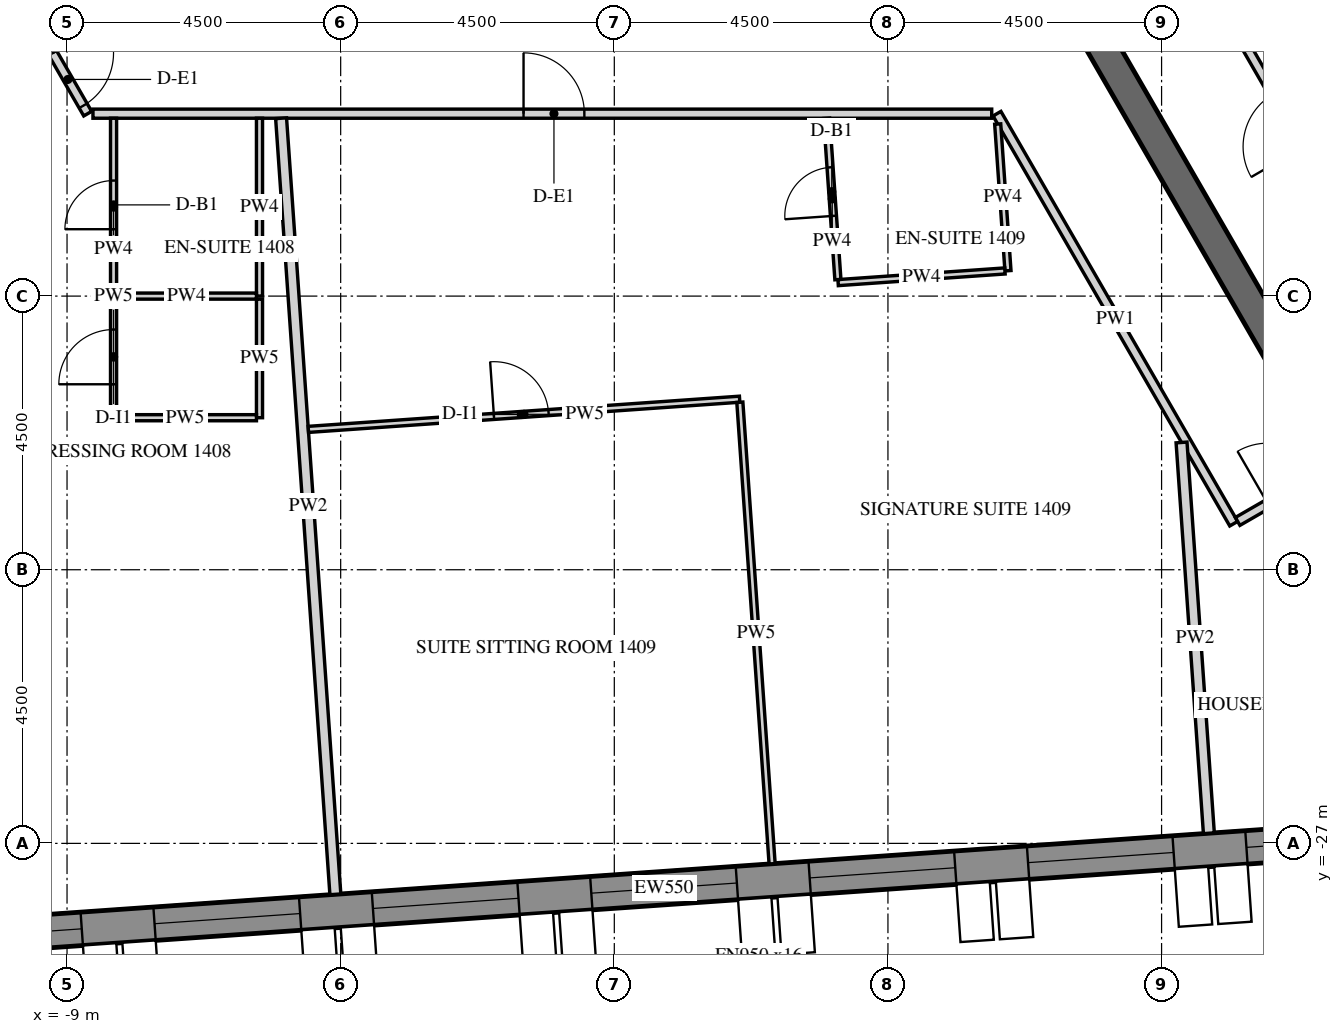
"""IFC4 building model, lengths in metres.
Left out: names, types, materials, properties, quantities, classifications, styles, units other than length and angle.
Written with IfcOpenShell. Run it as: python <this file> out.ifc"""

import sys

from ifc_helpers import new_model, si_unit, direction, frame, frame_2d, origin, place, context, subcontext, project, spatial, polyline, rectangle, outline, extrude, element, fill, save


model = new_model("IFC4")
c1 = context("Model", 3, precision=1e-05, world=origin(), true_north=direction((0.0, 1.0)))
c2 = subcontext(c1, "Body", "Model", "MODEL_VIEW")
j1 = project(units=[si_unit("LENGTHUNIT", "METRE"), si_unit("PLANEANGLEUNIT", "RADIAN")], contexts=[c1])
p1 = place(None, origin())
s1 = spatial("IfcSite", under=j1, at=p1, CompositionType="ELEMENT")
p2 = place(p1, origin())
s2 = spatial("IfcBuilding", under=s1, at=p2, CompositionType="ELEMENT")
p3 = place(p2, frame((0.0, 0.0, 183.9)))
s3 = spatial("IfcBuildingStorey", under=s2, at=p3, CompositionType="ELEMENT", Elevation=183.9)
p4 = place(p3, frame((-13.026, -28.704, -0.15), z_axis=(0.0, 0.0, 1.0), x_axis=(0.99756406806, 0.069756219185, 0.0)))
e1 = element("IfcWall", 1, at=p4, inside=s3, PredefinedType="SOLIDWALL", context=c2, shape_type="SweptSolid", body=[
    extrude(outline(polyline([(-0.026, -0.275), (27.78, -0.275), (27.735, 0.275), (0.026, 0.275), (-0.026, -0.275)])), origin(), (0.0, 0.0, 1.0), 3.9),
])
p5 = place(p4, frame((1.879, 0.0, 1.05)))
e2 = element("IfcOpeningElement", 2, at=p5, cuts=e1, PredefinedType="OPENING", context=c2, shape_type="SweptSolid", body=[
    extrude(rectangle(XDim=2.4, YDim=2.4, at=frame_2d((1.2, 1.2))), frame((0.0, 0.285, 0.0), z_axis=(0.0, -1.0, 0.0), x_axis=(1.0, 0.0, 0.0)), (0.0, 0.0, 1.0), 0.57),
])
p6 = place(p4, frame((5.479, 0.0, 1.05)))
e3 = element("IfcOpeningElement", 3, at=p6, cuts=e1, PredefinedType="OPENING", context=c2, shape_type="SweptSolid", body=[
    extrude(rectangle(XDim=2.4, YDim=2.4, at=frame_2d((1.2, 1.2))), frame((0.0, 0.285, 0.0), z_axis=(0.0, -1.0, 0.0), x_axis=(1.0, 0.0, 0.0)), (0.0, 0.0, 1.0), 0.57),
])
p7 = place(p4, frame((9.079, 0.0, 1.05)))
e4 = element("IfcOpeningElement", 4, at=p7, cuts=e1, PredefinedType="OPENING", context=c2, shape_type="SweptSolid", body=[
    extrude(rectangle(XDim=2.4, YDim=2.4, at=frame_2d((1.2, 1.2))), frame((0.0, 0.285, 0.0), z_axis=(0.0, -1.0, 0.0), x_axis=(1.0, 0.0, 0.0)), (0.0, 0.0, 1.0), 0.57),
])
p8 = place(p4, frame((12.679, 0.0, 1.05)))
e5 = element("IfcOpeningElement", 5, at=p8, cuts=e1, PredefinedType="OPENING", context=c2, shape_type="SweptSolid", body=[
    extrude(rectangle(XDim=2.4, YDim=2.4, at=frame_2d((1.2, 1.2))), frame((0.0, 0.285, 0.0), z_axis=(0.0, -1.0, 0.0), x_axis=(1.0, 0.0, 0.0)), (0.0, 0.0, 1.0), 0.57),
])
p9 = place(p4, frame((16.279, 0.0, 1.05)))
e6 = element("IfcOpeningElement", 6, at=p9, cuts=e1, PredefinedType="OPENING", context=c2, shape_type="SweptSolid", body=[
    extrude(rectangle(XDim=2.4, YDim=2.4, at=frame_2d((1.2, 1.2))), frame((0.0, 0.285, 0.0), z_axis=(0.0, -1.0, 0.0), x_axis=(1.0, 0.0, 0.0)), (0.0, 0.0, 1.0), 0.57),
])
p10 = place(p4, frame((19.879, 0.0, 1.05)))
e7 = element("IfcOpeningElement", 7, at=p10, cuts=e1, PredefinedType="OPENING", context=c2, shape_type="SweptSolid", body=[
    extrude(rectangle(XDim=2.4, YDim=2.4, at=frame_2d((1.2, 1.2))), frame((0.0, 0.285, 0.0), z_axis=(0.0, -1.0, 0.0), x_axis=(1.0, 0.0, 0.0)), (0.0, 0.0, 1.0), 0.57),
])
p11 = place(p4, frame((23.479, 0.0, 1.05)))
e8 = element("IfcOpeningElement", 8, at=p11, cuts=e1, PredefinedType="OPENING", context=c2, shape_type="SweptSolid", body=[
    extrude(rectangle(XDim=2.4, YDim=2.4, at=frame_2d((1.2, 1.2))), frame((0.0, 0.285, 0.0), z_axis=(0.0, -1.0, 0.0), x_axis=(1.0, 0.0, 0.0)), (0.0, 0.0, 1.0), 0.57),
])
p12 = place(p3, frame((7.506, -13.0, -0.15), z_axis=(0.0, 0.0, 1.0), x_axis=(0.499988271576, -0.866032175087, 0.0)))
e9 = element("IfcWall", 9, at=p12, inside=s3, PredefinedType="SHEAR", context=c2, shape_type="SweptSolid", body=[
    extrude(rectangle(XDim=15.424, YDim=0.5, at=frame_2d((7.712, 0.0))), origin(), (0.0, 0.0, 1.0), 3.9),
])
p13 = place(p12, frame((6.812, 0.0, 0.15)))
e10 = element("IfcOpeningElement", 10, at=p13, cuts=e9, PredefinedType="OPENING", context=c2, shape_type="SweptSolid", body=[
    extrude(rectangle(XDim=1.8, YDim=2.4, at=frame_2d((0.9, 1.2))), frame((0.0, 0.26, 0.0), z_axis=(0.0, -1.0, 0.0), x_axis=(1.0, 0.0, 0.0)), (0.0, 0.0, 1.0), 0.52),
])
p14 = place(p3, frame((-16.094, -2.125, 0.0), z_axis=(0.0, 0.0, 1.0), x_axis=(0.500010545262, -0.866019315389, 0.0)))
e11 = element("IfcWall", 11, at=p14, inside=s3, PredefinedType="PARTITIONING", context=c2, shape_type="SweptSolid", body=[
    extrude(rectangle(XDim=14.867, YDim=0.15, at=frame_2d((7.434, 0.0))), origin(), (0.0, 0.0, 1.0), 2.988),
])
p15 = place(p14, frame((1.019, 0.0, 0.0)))
e12 = element("IfcOpeningElement", 12, at=p15, cuts=e11, PredefinedType="OPENING", context=c2, shape_type="SweptSolid", body=[
    extrude(rectangle(XDim=1.0, YDim=2.1, at=frame_2d((0.5, 1.05))), frame((0.0, 0.085, 0.0), z_axis=(0.0, -1.0, 0.0), x_axis=(1.0, 0.0, 0.0)), (0.0, 0.0, 1.0), 0.17),
])
p16 = place(p14, frame((9.824, 0.0, 0.0)))
e13 = element("IfcOpeningElement", 13, at=p16, cuts=e11, PredefinedType="OPENING", context=c2, shape_type="SweptSolid", body=[
    extrude(rectangle(XDim=1.0, YDim=2.1, at=frame_2d((0.5, 1.05))), frame((0.0, 0.085, 0.0), z_axis=(0.0, -1.0, 0.0), x_axis=(1.0, 0.0, 0.0)), (0.0, 0.0, 1.0), 0.17),
])
p17 = place(p14, frame((13.717, 0.0, 0.0)))
e14 = element("IfcOpeningElement", 14, at=p17, cuts=e11, PredefinedType="OPENING", context=c2, shape_type="SweptSolid", body=[
    extrude(rectangle(XDim=1.0, YDim=2.1, at=frame_2d((0.5, 1.05))), frame((0.0, 0.085, 0.0), z_axis=(0.0, -1.0, 0.0), x_axis=(1.0, 0.0, 0.0)), (0.0, 0.0, 1.0), 0.17),
])
p18 = place(p3, frame((-8.574, -15.0, 0.0), z_axis=(0.0, 0.0, 1.0), x_axis=(1.0, 0.0, 0.0)))
e15 = element("IfcWall", 15, at=p18, inside=s3, PredefinedType="PARTITIONING", context=c2, shape_type="SweptSolid", body=[
    extrude(rectangle(XDim=14.78, YDim=0.15, at=frame_2d((7.39, 0.0))), origin(), (0.0, 0.0, 1.0), 2.988),
])
p19 = place(p18, frame((7.081, 0.0, 0.0)))
e16 = element("IfcOpeningElement", 16, at=p19, cuts=e15, PredefinedType="OPENING", context=c2, shape_type="SweptSolid", body=[
    extrude(rectangle(XDim=1.0, YDim=2.1, at=frame_2d((0.5, 1.05))), frame((0.0, 0.085, 0.0), z_axis=(0.0, -1.0, 0.0), x_axis=(1.0, 0.0, 0.0)), (0.0, 0.0, 1.0), 0.17),
])
p20 = place(p3, frame((6.293, -15.0, 0.0), z_axis=(0.0, 0.0, 1.0), x_axis=(0.499980313799, -0.86603676932, 0.0)))
e17 = element("IfcWall", 17, at=p20, inside=s3, PredefinedType="PARTITIONING", context=c2, shape_type="SweptSolid", body=[
    extrude(rectangle(XDim=7.786, YDim=0.15, at=frame_2d((3.893, 0.0))), origin(), (0.0, 0.0, 1.0), 2.988),
])
p21 = place(p3, frame((10.251, -21.705, 0.0), z_axis=(0.0, 0.0, 1.0), x_axis=(0.866013532718, 0.500020560727, 0.0)))
e18 = element("IfcWall", 18, at=p21, inside=s3, PredefinedType="PARTITIONING", context=c2, shape_type="SweptSolid", body=[
    extrude(rectangle(XDim=1.725, YDim=0.15, at=frame_2d((0.863, 0.0))), origin(), (0.0, 0.0, 1.0), 2.988),
])
p22 = place(p21, frame((0.575, 0.0, 0.0)))
e19 = element("IfcOpeningElement", 19, at=p22, cuts=e18, PredefinedType="OPENING", context=c2, shape_type="SweptSolid", body=[
    extrude(rectangle(XDim=1.0, YDim=2.1, at=frame_2d((0.5, 1.05))), frame((0.0, 0.085, 0.0), z_axis=(0.0, -1.0, 0.0), x_axis=(1.0, 0.0, 0.0)), (0.0, 0.0, 1.0), 0.17),
])
p23 = place(p3, frame((13.699, -19.628, 0.0), z_axis=(0.0, 0.0, 1.0), x_axis=(-0.499993780622, 0.866028994514, 0.0)))
e20 = element("IfcWall", 20, at=p23, inside=s3, PredefinedType="PARTITIONING", context=c2, shape_type="SweptSolid", body=[
    extrude(rectangle(XDim=7.711, YDim=0.15, at=frame_2d((3.855, 0.0))), origin(), (0.0, 0.0, 1.0), 2.988),
])
p24 = place(p23, frame((4.718, 0.0, 0.0)))
e21 = element("IfcOpeningElement", 21, at=p24, cuts=e20, PredefinedType="OPENING", context=c2, shape_type="SweptSolid", body=[
    extrude(rectangle(XDim=1.0, YDim=2.1, at=frame_2d((0.5, 1.05))), frame((0.0, 0.085, 0.0), z_axis=(0.0, -1.0, 0.0), x_axis=(1.0, 0.0, 0.0)), (0.0, 0.0, 1.0), 0.17),
])
p25 = place(p3, frame((-8.235, -18.0, 0.0), z_axis=(0.0, 0.0, 1.0), x_axis=(0.0, 1.0, 0.0)))
e22 = element("IfcWall", 22, at=p25, inside=s3, PredefinedType="PARTITIONING", context=c2, shape_type="SweptSolid", body=[
    extrude(rectangle(XDim=2.925, YDim=0.1, at=frame_2d((1.462, 0.0))), origin(), (0.0, 0.0, 1.0), 2.988),
])
p26 = place(p25, frame((1.1, 0.0, 0.0)))
e23 = element("IfcOpeningElement", 23, at=p26, cuts=e22, PredefinedType="OPENING", context=c2, shape_type="SweptSolid", body=[
    extrude(rectangle(XDim=0.8, YDim=2.1, at=frame_2d((0.4, 1.05))), frame((0.0, 0.06, 0.0), z_axis=(0.0, -1.0, 0.0), x_axis=(1.0, 0.0, 0.0)), (0.0, 0.0, 1.0), 0.12),
])
p27 = place(p3, frame((-5.835, -15.075, 0.0), z_axis=(0.0, 0.0, 1.0), x_axis=(0.0, -1.0, 0.0)))
e24 = element("IfcWall", 24, at=p27, inside=s3, PredefinedType="PARTITIONING", context=c2, shape_type="SweptSolid", body=[
    extrude(rectangle(XDim=2.925, YDim=0.1, at=frame_2d((1.462, 0.0))), origin(), (0.0, 0.0, 1.0), 2.988),
])
p28 = place(p3, frame((-5.835, -18.05, 0.0), z_axis=(0.0, 0.0, 1.0), x_axis=(0.0, -1.0, 0.0)))
e25 = element("IfcWall", 25, at=p28, inside=s3, PredefinedType="PARTITIONING", context=c2, shape_type="SweptSolid", body=[
    extrude(rectangle(XDim=1.95, YDim=0.1, at=frame_2d((0.975, 0.0))), origin(), (0.0, 0.0, 1.0), 2.988),
])
p29 = place(p3, frame((-5.885, -20.0, 0.0), z_axis=(0.0, 0.0, 1.0), x_axis=(-1.0, 0.0, 0.0)))
e26 = element("IfcWall", 26, at=p29, inside=s3, PredefinedType="PARTITIONING", context=c2, shape_type="SweptSolid", body=[
    extrude(rectangle(XDim=2.35, YDim=0.1, at=frame_2d((1.175, 0.0))), origin(), (0.0, 0.0, 1.0), 2.988),
])
p30 = place(p3, frame((-8.235, -19.95, 0.0), z_axis=(0.0, 0.0, 1.0), x_axis=(0.0, 1.0, 0.0)))
e27 = element("IfcWall", 27, at=p30, inside=s3, PredefinedType="PARTITIONING", context=c2, shape_type="SweptSolid", body=[
    extrude(rectangle(XDim=1.9, YDim=0.1, at=frame_2d((0.95, 0.0))), origin(), (0.0, 0.0, 1.0), 2.988),
])
p31 = place(p30, frame((0.5, 0.0, 0.0)))
e28 = element("IfcOpeningElement", 28, at=p31, cuts=e27, PredefinedType="OPENING", context=c2, shape_type="SweptSolid", body=[
    extrude(rectangle(XDim=0.9, YDim=2.1, at=frame_2d((0.45, 1.05))), frame((0.0, 0.06, 0.0), z_axis=(0.0, -1.0, 0.0), x_axis=(1.0, 0.0, 0.0)), (0.0, 0.0, 1.0), 0.12),
])
p32 = place(p3, frame((-4.587, -27.838, 0.0), z_axis=(0.0, 0.0, 1.0), x_axis=(-0.069764754112, 0.997563471206, 0.0)))
e29 = element("IfcWall", 29, at=p32, inside=s3, PredefinedType="PARTITIONING", context=c2, shape_type="SweptSolid", body=[
    extrude(rectangle(XDim=12.794, YDim=0.18, at=frame_2d((6.397, 0.0))), origin(), (0.0, 0.0, 1.0), 2.988),
])
p33 = place(p3, frame((-8.185, -18.0, 0.0), z_axis=(0.0, 0.0, 1.0), x_axis=(1.0, 0.0, 0.0)))
e30 = element("IfcWall", 30, at=p33, inside=s3, PredefinedType="PARTITIONING", context=c2, shape_type="SweptSolid", body=[
    extrude(rectangle(XDim=2.3, YDim=0.1, at=frame_2d((1.15, 0.0))), origin(), (0.0, 0.0, 1.0), 2.988),
])
p34 = place(p3, frame((6.305, -15.171, 0.0), z_axis=(0.0, 0.0, 1.0), x_axis=(0.069661348173, -0.99757069753, 0.0)))
e31 = element("IfcWall", 31, at=p34, inside=s3, PredefinedType="PARTITIONING", context=c2, shape_type="SweptSolid", body=[
    extrude(rectangle(XDim=2.418, YDim=0.1, at=frame_2d((1.209, 0.0))), origin(), (0.0, 0.0, 1.0), 2.988),
])
p35 = place(p3, frame((6.424, -17.586, 0.0), z_axis=(0.0, 0.0, 1.0), x_axis=(-0.997562182015, -0.069783185748, 0.0)))
e32 = element("IfcWall", 32, at=p35, inside=s3, PredefinedType="PARTITIONING", context=c2, shape_type="SweptSolid", body=[
    extrude(rectangle(XDim=2.75, YDim=0.1, at=frame_2d((1.375, 0.0))), origin(), (0.0, 0.0, 1.0), 2.988),
])
p36 = place(p3, frame((3.677, -17.728, 0.0), z_axis=(0.0, 0.0, 1.0), x_axis=(-0.069759707979, 0.997563824095, 0.0)))
e33 = element("IfcWall", 33, at=p36, inside=s3, PredefinedType="PARTITIONING", context=c2, shape_type="SweptSolid", body=[
    extrude(rectangle(XDim=2.66, YDim=0.1, at=frame_2d((1.33, 0.0))), origin(), (0.0, 0.0, 1.0), 2.988),
])
p37 = place(p36, frame((1.05, 0.0, 0.0)))
e34 = element("IfcOpeningElement", 34, at=p37, cuts=e33, PredefinedType="OPENING", context=c2, shape_type="SweptSolid", body=[
    extrude(rectangle(XDim=0.8, YDim=2.1, at=frame_2d((0.4, 1.05))), frame((0.0, 0.06, 0.0), z_axis=(0.0, -1.0, 0.0), x_axis=(1.0, 0.0, 0.0)), (0.0, 0.0, 1.0), 0.12),
])
p38 = place(p3, frame((-5.032, -20.192, 0.0), z_axis=(0.0, 0.0, 1.0), x_axis=(0.997562888251, 0.069773089251, 0.0)))
e35 = element("IfcWall", 35, at=p38, inside=s3, PredefinedType="PARTITIONING", context=c2, shape_type="SweptSolid", body=[
    extrude(rectangle(XDim=7.11, YDim=0.1, at=frame_2d((3.555, 0.0))), origin(), (0.0, 0.0, 1.0), 2.988),
])
p39 = place(p38, frame((3.06, 0.0, 0.0)))
e36 = element("IfcOpeningElement", 36, at=p39, cuts=e35, PredefinedType="OPENING", context=c2, shape_type="SweptSolid", body=[
    extrude(rectangle(XDim=0.9, YDim=2.1, at=frame_2d((0.45, 1.05))), frame((0.0, 0.06, 0.0), z_axis=(0.0, -1.0, 0.0), x_axis=(1.0, 0.0, 0.0)), (0.0, 0.0, 1.0), 0.12),
])
p40 = place(p3, frame((2.064, -19.746, 0.0), z_axis=(0.0, 0.0, 1.0), x_axis=(0.069762387692, -0.997563636699, 0.0)))
e37 = element("IfcWall", 37, at=p40, inside=s3, PredefinedType="PARTITIONING", context=c2, shape_type="SweptSolid", body=[
    extrude(rectangle(XDim=7.608, YDim=0.1, at=frame_2d((3.804, 0.0))), origin(), (0.0, 0.0, 1.0), 2.988),
])
p41 = place(p3, frame((9.778, -26.833, 0.0), z_axis=(0.0, 0.0, 1.0), x_axis=(-0.069733334443, 0.997565668048, 0.0)))
e38 = element("IfcWall", 38, at=p41, inside=s3, PredefinedType="PARTITIONING", context=c2, shape_type="SweptSolid", body=[
    extrude(rectangle(XDim=6.442, YDim=0.18, at=frame_2d((3.221, 0.0))), origin(), (0.0, 0.0, 1.0), 2.988),
])
p42 = place(p5, frame((0.0, 0.205, 0.0)))
e39 = element("IfcWindow", 39, at=p42, inside=s3, PartitioningType="DOUBLE_PANEL_VERTICAL", PredefinedType="WINDOW", context=c2, shape_type="SweptSolid", body=[
    extrude(rectangle(XDim=2.4, YDim=2.4, at=frame_2d((1.2, 1.2))), frame((0.0, 0.03, 0.0), z_axis=(0.0, -1.0, 0.0), x_axis=(1.0, 0.0, 0.0)), (0.0, 0.0, 1.0), 0.06),
])
fill(e2, e39)
p43 = place(p6, frame((0.0, 0.205, 0.0)))
e40 = element("IfcWindow", 40, at=p43, inside=s3, PartitioningType="DOUBLE_PANEL_VERTICAL", PredefinedType="WINDOW", context=c2, shape_type="SweptSolid", body=[
    extrude(rectangle(XDim=2.4, YDim=2.4, at=frame_2d((1.2, 1.2))), frame((0.0, 0.03, 0.0), z_axis=(0.0, -1.0, 0.0), x_axis=(1.0, 0.0, 0.0)), (0.0, 0.0, 1.0), 0.06),
])
fill(e3, e40)
p44 = place(p7, frame((0.0, 0.205, 0.0)))
e41 = element("IfcWindow", 41, at=p44, inside=s3, PartitioningType="DOUBLE_PANEL_VERTICAL", PredefinedType="WINDOW", context=c2, shape_type="SweptSolid", body=[
    extrude(rectangle(XDim=2.4, YDim=2.4, at=frame_2d((1.2, 1.2))), frame((0.0, 0.03, 0.0), z_axis=(0.0, -1.0, 0.0), x_axis=(1.0, 0.0, 0.0)), (0.0, 0.0, 1.0), 0.06),
])
fill(e4, e41)
p45 = place(p8, frame((0.0, 0.205, 0.0)))
e42 = element("IfcWindow", 42, at=p45, inside=s3, PartitioningType="DOUBLE_PANEL_VERTICAL", PredefinedType="WINDOW", context=c2, shape_type="SweptSolid", body=[
    extrude(rectangle(XDim=2.4, YDim=2.4, at=frame_2d((1.2, 1.2))), frame((0.0, 0.03, 0.0), z_axis=(0.0, -1.0, 0.0), x_axis=(1.0, 0.0, 0.0)), (0.0, 0.0, 1.0), 0.06),
])
fill(e5, e42)
p46 = place(p9, frame((0.0, 0.205, 0.0)))
e43 = element("IfcWindow", 43, at=p46, inside=s3, PartitioningType="DOUBLE_PANEL_VERTICAL", PredefinedType="WINDOW", context=c2, shape_type="SweptSolid", body=[
    extrude(rectangle(XDim=2.4, YDim=2.4, at=frame_2d((1.2, 1.2))), frame((0.0, 0.03, 0.0), z_axis=(0.0, -1.0, 0.0), x_axis=(1.0, 0.0, 0.0)), (0.0, 0.0, 1.0), 0.06),
])
fill(e6, e43)
p47 = place(p10, frame((0.0, 0.205, 0.0)))
e44 = element("IfcWindow", 44, at=p47, inside=s3, PartitioningType="DOUBLE_PANEL_VERTICAL", PredefinedType="WINDOW", context=c2, shape_type="SweptSolid", body=[
    extrude(rectangle(XDim=2.4, YDim=2.4, at=frame_2d((1.2, 1.2))), frame((0.0, 0.03, 0.0), z_axis=(0.0, -1.0, 0.0), x_axis=(1.0, 0.0, 0.0)), (0.0, 0.0, 1.0), 0.06),
])
fill(e7, e44)
p48 = place(p11, frame((0.0, 0.205, 0.0)))
e45 = element("IfcWindow", 45, at=p48, inside=s3, PartitioningType="DOUBLE_PANEL_VERTICAL", PredefinedType="WINDOW", context=c2, shape_type="SweptSolid", body=[
    extrude(rectangle(XDim=2.4, YDim=2.4, at=frame_2d((1.2, 1.2))), frame((0.0, 0.03, 0.0), z_axis=(0.0, -1.0, 0.0), x_axis=(1.0, 0.0, 0.0)), (0.0, 0.0, 1.0), 0.06),
])
fill(e8, e45)
p49 = place(p17, origin())
e46 = element("IfcDoor", 46, at=p49, inside=s3, OperationType="SINGLE_SWING_LEFT", PredefinedType="DOOR", context=c2, shape_type="SweptSolid", body=[
    extrude(rectangle(XDim=1.0, YDim=2.1, at=frame_2d((0.5, 1.05))), frame((0.0, 0.025, 0.0), z_axis=(0.0, -1.0, 0.0), x_axis=(1.0, 0.0, 0.0)), (0.0, 0.0, 1.0), 0.05),
])
fill(e14, e46)
p50 = place(p26, origin())
e47 = element("IfcDoor", 47, at=p50, inside=s3, OperationType="SINGLE_SWING_LEFT", PredefinedType="DOOR", context=c2, shape_type="SweptSolid", body=[
    extrude(rectangle(XDim=0.8, YDim=2.1, at=frame_2d((0.4, 1.05))), frame((0.0, 0.025, 0.0), z_axis=(0.0, -1.0, 0.0), x_axis=(1.0, 0.0, 0.0)), (0.0, 0.0, 1.0), 0.05),
])
fill(e23, e47)
p51 = place(p31, origin())
e48 = element("IfcDoor", 48, at=p51, inside=s3, OperationType="SINGLE_SWING_LEFT", PredefinedType="DOOR", context=c2, shape_type="SweptSolid", body=[
    extrude(rectangle(XDim=0.9, YDim=2.1, at=frame_2d((0.45, 1.05))), frame((0.0, 0.025, 0.0), z_axis=(0.0, -1.0, 0.0), x_axis=(1.0, 0.0, 0.0)), (0.0, 0.0, 1.0), 0.05),
])
fill(e28, e48)
p52 = place(p19, origin())
e49 = element("IfcDoor", 49, at=p52, inside=s3, OperationType="SINGLE_SWING_RIGHT", PredefinedType="DOOR", context=c2, shape_type="SweptSolid", body=[
    extrude(rectangle(XDim=1.0, YDim=2.1, at=frame_2d((0.5, 1.05))), frame((0.0, 0.025, 0.0), z_axis=(0.0, -1.0, 0.0), x_axis=(1.0, 0.0, 0.0)), (0.0, 0.0, 1.0), 0.05),
])
fill(e16, e49)
p53 = place(p37, origin())
e50 = element("IfcDoor", 50, at=p53, inside=s3, OperationType="SINGLE_SWING_LEFT", PredefinedType="DOOR", context=c2, shape_type="SweptSolid", body=[
    extrude(rectangle(XDim=0.8, YDim=2.1, at=frame_2d((0.4, 1.05))), frame((0.0, 0.025, 0.0), z_axis=(0.0, -1.0, 0.0), x_axis=(1.0, 0.0, 0.0)), (0.0, 0.0, 1.0), 0.05),
])
fill(e34, e50)
p54 = place(p39, origin())
e51 = element("IfcDoor", 51, at=p54, inside=s3, OperationType="SINGLE_SWING_RIGHT", PredefinedType="DOOR", context=c2, shape_type="SweptSolid", body=[
    extrude(rectangle(XDim=0.9, YDim=2.1, at=frame_2d((0.45, 1.05))), frame((0.0, 0.025, 0.0), z_axis=(0.0, -1.0, 0.0), x_axis=(1.0, 0.0, 0.0)), (0.0, 0.0, 1.0), 0.05),
])
fill(e36, e51)
save(model, sys.argv[1])
